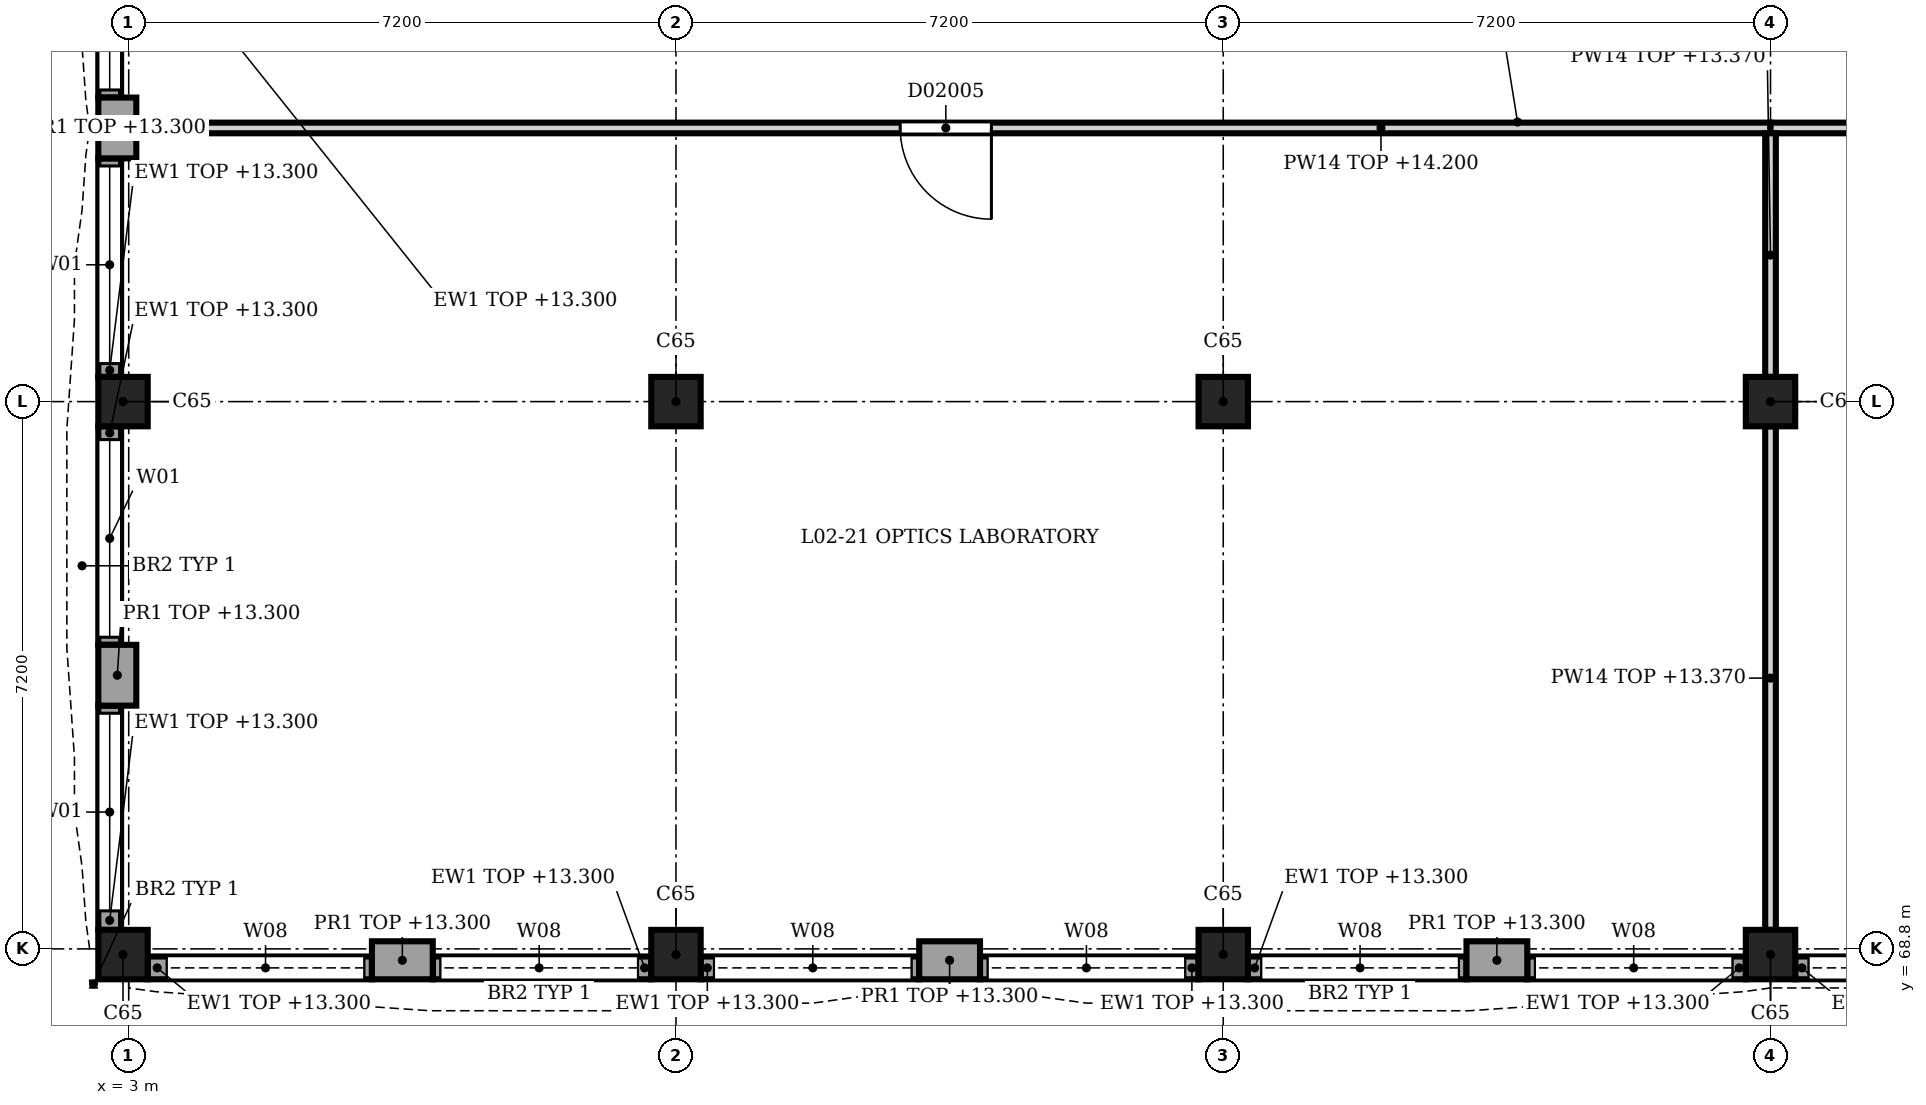
"""IFC4 building model, lengths in metres.
Left out: names, types, materials, properties, quantities, classifications, styles, units other than length and angle.
Written with IfcOpenShell. Run it as: python <this file> out.ifc"""

import sys

from ifc_helpers import new_model, si_unit, direction, frame, frame_2d, origin, origin_2d, place, context, subcontext, project, spatial, rectangle, extrude, element, fill, save


model = new_model("IFC4")
c1 = context("Model", 3, precision=1e-05, world=origin(), true_north=direction((0.0, 1.0)))
c2 = subcontext(c1, "Body", "Model", "MODEL_VIEW")
j1 = project(units=[si_unit("LENGTHUNIT", "METRE"), si_unit("PLANEANGLEUNIT", "RADIAN")], contexts=[c1])
p1 = place(None, origin())
s1 = spatial("IfcSite", under=j1, at=p1, CompositionType="ELEMENT")
p2 = place(p1, origin())
s2 = spatial("IfcBuilding", under=s1, at=p2, CompositionType="ELEMENT")
p3 = place(p2, frame((0.0, 0.0, 9.9)))
s3 = spatial("IfcBuildingStorey", under=s2, at=p3, CompositionType="ELEMENT", Elevation=9.9)
for number, where, z_axis, x_axis in (
    (1, (2.925, 68.725, 0.0), (0.0, 0.0, 1.0), (1.0, 0.0, 0.0)),
    (2, (2.925, 76.0, 0.0), (0.0, 0.0, 1.0), (1.0, 0.0, 0.0)),
    (3, (10.2, 68.725, 0.0), (0.0, 0.0, 1.0), (1.0, 0.0, 0.0)),
    (4, (10.2, 76.0, 0.0), (0.0, 0.0, 1.0), (1.0, 0.0, 0.0)),
    (5, (17.4, 68.725, 0.0), (0.0, 0.0, 1.0), (1.0, 0.0, 0.0)),
    (6, (17.4, 76.0, 0.0), (0.0, 0.0, 1.0), (1.0, 0.0, 0.0)),
    (7, (24.6, 68.725, 0.0), (0.0, 0.0, 1.0), (1.0, 0.0, 0.0)),
    (8, (24.6, 76.0, 0.0), (0.0, 0.0, 1.0), (1.0, 0.0, 0.0)),
):
    element("IfcColumn", number, at=place(p3, frame(where, z_axis=z_axis, x_axis=x_axis)), inside=s3, PredefinedType="COLUMN", context=c2, shape_type="SweptSolid", body=[
        extrude(rectangle(XDim=0.65, YDim=0.65, at=origin_2d()), origin(), (0.0, 0.0, 1.0), 4.5),
    ])
p4 = place(p3, frame((21.4, 68.65, 0.0), z_axis=(0.0, 0.0, 1.0), x_axis=(-1.0, 0.0, 0.0)))
e9 = element("IfcWall", 9, at=p4, inside=s3, PredefinedType="SOLIDWALL", context=c2, shape_type="SweptSolid", body=[
    extrude(rectangle(XDim=0.8, YDim=0.5, at=frame_2d((0.4, 0.0))), origin(), (0.0, 0.0, 1.0), 3.4),
])
for number, where, z_axis, x_axis in (
    (10, (14.2, 68.65, 0.0), (0.0, 0.0, 1.0), (-1.0, 0.0, 0.0)),
    (11, (7.0, 68.65, 0.0), (0.0, 0.0, 1.0), (-1.0, 0.0, 0.0)),
):
    element("IfcWall", number, at=place(p3, frame(where, z_axis=z_axis, x_axis=x_axis)), inside=s3, PredefinedType="SOLIDWALL", context=c2, shape_type="SweptSolid", body=[
        extrude(rectangle(XDim=0.8, YDim=0.5, at=frame_2d((0.4, 0.0))), origin(), (0.0, 0.0, 1.0), 3.4),
    ])
p5 = place(p3, frame((27.8, 68.55, 0.0), z_axis=(0.0, 0.0, 1.0), x_axis=(-1.0, 0.0, 0.0)))
e12 = element("IfcWall", 12, at=p5, inside=s3, PredefinedType="SOLIDWALL", context=c2, shape_type="SweptSolid", body=[
    extrude(rectangle(XDim=2.875, YDim=0.3, at=frame_2d((1.438, 0.0))), origin(), (0.0, 0.0, 1.0), 3.4),
])
p6 = place(p5, frame((0.1, 0.0, 1.2)))
e13 = element("IfcOpeningElement", 13, at=p6, cuts=e12, PredefinedType="OPENING", context=c2, shape_type="SweptSolid", body=[
    extrude(rectangle(XDim=2.6, YDim=2.1, at=frame_2d((1.3, 1.05))), frame((0.0, 0.16, 0.0), z_axis=(0.0, -1.0, 0.0), x_axis=(1.0, 0.0, 0.0)), (0.0, 0.0, 1.0), 0.32),
])
p7 = place(p3, frame((24.275, 68.55, 0.0), z_axis=(0.0, 0.0, 1.0), x_axis=(-1.0, 0.0, 0.0)))
e14 = element("IfcWall", 14, at=p7, inside=s3, PredefinedType="SOLIDWALL", context=c2, shape_type="SweptSolid", body=[
    extrude(rectangle(XDim=2.875, YDim=0.3, at=frame_2d((1.438, 0.0))), origin(), (0.0, 0.0, 1.0), 3.4),
])
p8 = place(p7, frame((0.175, 0.0, 1.2)))
e15 = element("IfcOpeningElement", 15, at=p8, cuts=e14, PredefinedType="OPENING", context=c2, shape_type="SweptSolid", body=[
    extrude(rectangle(XDim=2.6, YDim=2.1, at=frame_2d((1.3, 1.05))), frame((0.0, 0.16, 0.0), z_axis=(0.0, -1.0, 0.0), x_axis=(1.0, 0.0, 0.0)), (0.0, 0.0, 1.0), 0.32),
])
p9 = place(p3, frame((20.6, 68.55, 0.0), z_axis=(0.0, 0.0, 1.0), x_axis=(-1.0, 0.0, 0.0)))
e16 = element("IfcWall", 16, at=p9, inside=s3, PredefinedType="SOLIDWALL", context=c2, shape_type="SweptSolid", body=[
    extrude(rectangle(XDim=2.875, YDim=0.3, at=frame_2d((1.438, 0.0))), origin(), (0.0, 0.0, 1.0), 3.4),
])
p10 = place(p9, frame((0.1, 0.0, 1.2)))
e17 = element("IfcOpeningElement", 17, at=p10, cuts=e16, PredefinedType="OPENING", context=c2, shape_type="SweptSolid", body=[
    extrude(rectangle(XDim=2.6, YDim=2.1, at=frame_2d((1.3, 1.05))), frame((0.0, 0.16, 0.0), z_axis=(0.0, -1.0, 0.0), x_axis=(1.0, 0.0, 0.0)), (0.0, 0.0, 1.0), 0.32),
])
p11 = place(p3, frame((17.075, 68.55, 0.0), z_axis=(0.0, 0.0, 1.0), x_axis=(-1.0, 0.0, 0.0)))
e18 = element("IfcWall", 18, at=p11, inside=s3, PredefinedType="SOLIDWALL", context=c2, shape_type="SweptSolid", body=[
    extrude(rectangle(XDim=2.875, YDim=0.3, at=frame_2d((1.438, 0.0))), origin(), (0.0, 0.0, 1.0), 3.4),
])
p12 = place(p11, frame((0.175, 0.0, 1.2)))
e19 = element("IfcOpeningElement", 19, at=p12, cuts=e18, PredefinedType="OPENING", context=c2, shape_type="SweptSolid", body=[
    extrude(rectangle(XDim=2.6, YDim=2.1, at=frame_2d((1.3, 1.05))), frame((0.0, 0.16, 0.0), z_axis=(0.0, -1.0, 0.0), x_axis=(1.0, 0.0, 0.0)), (0.0, 0.0, 1.0), 0.32),
])
p13 = place(p3, frame((13.4, 68.55, 0.0), z_axis=(0.0, 0.0, 1.0), x_axis=(-1.0, 0.0, 0.0)))
e20 = element("IfcWall", 20, at=p13, inside=s3, PredefinedType="SOLIDWALL", context=c2, shape_type="SweptSolid", body=[
    extrude(rectangle(XDim=2.875, YDim=0.3, at=frame_2d((1.438, 0.0))), origin(), (0.0, 0.0, 1.0), 3.4),
])
p14 = place(p13, frame((0.1, 0.0, 1.2)))
e21 = element("IfcOpeningElement", 21, at=p14, cuts=e20, PredefinedType="OPENING", context=c2, shape_type="SweptSolid", body=[
    extrude(rectangle(XDim=2.6, YDim=2.1, at=frame_2d((1.3, 1.05))), frame((0.0, 0.16, 0.0), z_axis=(0.0, -1.0, 0.0), x_axis=(1.0, 0.0, 0.0)), (0.0, 0.0, 1.0), 0.32),
])
p15 = place(p3, frame((9.875, 68.55, 0.0), z_axis=(0.0, 0.0, 1.0), x_axis=(-1.0, 0.0, 0.0)))
e22 = element("IfcWall", 22, at=p15, inside=s3, PredefinedType="SOLIDWALL", context=c2, shape_type="SweptSolid", body=[
    extrude(rectangle(XDim=2.875, YDim=0.3, at=frame_2d((1.438, 0.0))), origin(), (0.0, 0.0, 1.0), 3.4),
])
p16 = place(p15, frame((0.175, 0.0, 1.2)))
e23 = element("IfcOpeningElement", 23, at=p16, cuts=e22, PredefinedType="OPENING", context=c2, shape_type="SweptSolid", body=[
    extrude(rectangle(XDim=2.6, YDim=2.1, at=frame_2d((1.3, 1.05))), frame((0.0, 0.16, 0.0), z_axis=(0.0, -1.0, 0.0), x_axis=(1.0, 0.0, 0.0)), (0.0, 0.0, 1.0), 0.32),
])
p17 = place(p3, frame((6.2, 68.55, 0.0), z_axis=(0.0, 0.0, 1.0), x_axis=(-1.0, 0.0, 0.0)))
e24 = element("IfcWall", 24, at=p17, inside=s3, PredefinedType="SOLIDWALL", context=c2, shape_type="SweptSolid", body=[
    extrude(rectangle(XDim=2.95, YDim=0.3, at=frame_2d((1.475, 0.0))), origin(), (0.0, 0.0, 1.0), 3.4),
])
p18 = place(p17, frame((0.1, 0.0, 1.2)))
e25 = element("IfcOpeningElement", 25, at=p18, cuts=e24, PredefinedType="OPENING", context=c2, shape_type="SweptSolid", body=[
    extrude(rectangle(XDim=2.6, YDim=2.1, at=frame_2d((1.3, 1.05))), frame((0.0, 0.16, 0.0), z_axis=(0.0, -1.0, 0.0), x_axis=(1.0, 0.0, 0.0)), (0.0, 0.0, 1.0), 0.32),
])
for number, where, z_axis, x_axis in (
    (26, (2.85, 72.0, 0.0), (0.0, 0.0, 1.0), (0.0, 1.0, 0.0)),
    (27, (2.85, 79.2, 0.0), (0.0, 0.0, 1.0), (0.0, 1.0, 0.0)),
):
    element("IfcWall", number, at=place(p3, frame(where, z_axis=z_axis, x_axis=x_axis)), inside=s3, PredefinedType="SOLIDWALL", context=c2, shape_type="SweptSolid", body=[
        extrude(rectangle(XDim=0.8, YDim=0.5, at=frame_2d((0.4, 0.0))), origin(), (0.0, 0.0, 1.0), 3.4),
    ])
p19 = place(p3, frame((2.75, 69.05, 0.0), z_axis=(0.0, 0.0, 1.0), x_axis=(0.0, 1.0, 0.0)))
e28 = element("IfcWall", 28, at=p19, inside=s3, PredefinedType="SOLIDWALL", context=c2, shape_type="SweptSolid", body=[
    extrude(rectangle(XDim=2.95, YDim=0.3, at=frame_2d((1.475, 0.0))), origin(), (0.0, 0.0, 1.0), 3.4),
])
p20 = place(p19, frame((0.25, 0.0, 0.9)))
e29 = element("IfcOpeningElement", 29, at=p20, cuts=e28, PredefinedType="OPENING", context=c2, shape_type="SweptSolid", body=[
    extrude(rectangle(XDim=2.6, YDim=2.4, at=frame_2d((1.3, 1.2))), frame((0.0, 0.16, 0.0), z_axis=(0.0, -1.0, 0.0), x_axis=(1.0, 0.0, 0.0)), (0.0, 0.0, 1.0), 0.32),
])
p21 = place(p3, frame((2.75, 72.8, 0.0), z_axis=(0.0, 0.0, 1.0), x_axis=(0.0, 1.0, 0.0)))
e30 = element("IfcWall", 30, at=p21, inside=s3, PredefinedType="SOLIDWALL", context=c2, shape_type="SweptSolid", body=[
    extrude(rectangle(XDim=2.875, YDim=0.3, at=frame_2d((1.438, 0.0))), origin(), (0.0, 0.0, 1.0), 3.4),
])
p22 = place(p21, frame((0.1, 0.0, 0.9)))
e31 = element("IfcOpeningElement", 31, at=p22, cuts=e30, PredefinedType="OPENING", context=c2, shape_type="SweptSolid", body=[
    extrude(rectangle(XDim=2.6, YDim=2.4, at=frame_2d((1.3, 1.2))), frame((0.0, 0.16, 0.0), z_axis=(0.0, -1.0, 0.0), x_axis=(1.0, 0.0, 0.0)), (0.0, 0.0, 1.0), 0.32),
])
p23 = place(p3, frame((2.75, 76.325, 0.0), z_axis=(0.0, 0.0, 1.0), x_axis=(0.0, 1.0, 0.0)))
e32 = element("IfcWall", 32, at=p23, inside=s3, PredefinedType="SOLIDWALL", context=c2, shape_type="SweptSolid", body=[
    extrude(rectangle(XDim=2.875, YDim=0.3, at=frame_2d((1.438, 0.0))), origin(), (0.0, 0.0, 1.0), 3.4),
])
p24 = place(p23, frame((0.175, 0.0, 0.9)))
e33 = element("IfcOpeningElement", 33, at=p24, cuts=e32, PredefinedType="OPENING", context=c2, shape_type="SweptSolid", body=[
    extrude(rectangle(XDim=2.6, YDim=2.4, at=frame_2d((1.3, 1.2))), frame((0.0, 0.16, 0.0), z_axis=(0.0, -1.0, 0.0), x_axis=(1.0, 0.0, 0.0)), (0.0, 0.0, 1.0), 0.32),
])
p25 = place(p3, frame((2.75, 80.0, 0.0), z_axis=(0.0, 0.0, 1.0), x_axis=(0.0, 1.0, 0.0)))
e34 = element("IfcWall", 34, at=p25, inside=s3, PredefinedType="SOLIDWALL", context=c2, shape_type="SweptSolid", body=[
    extrude(rectangle(XDim=2.875, YDim=0.3, at=frame_2d((1.438, 0.0))), origin(), (0.0, 0.0, 1.0), 3.4),
])
p26 = place(p25, frame((0.1, 0.0, 0.9)))
e35 = element("IfcOpeningElement", 35, at=p26, cuts=e34, PredefinedType="OPENING", context=c2, shape_type="SweptSolid", body=[
    extrude(rectangle(XDim=2.6, YDim=2.4, at=frame_2d((1.3, 1.2))), frame((0.0, 0.16, 0.0), z_axis=(0.0, -1.0, 0.0), x_axis=(1.0, 0.0, 0.0)), (0.0, 0.0, 1.0), 0.32),
])
p27 = place(p3, frame((24.6, 79.6, 0.0), z_axis=(0.0, 0.0, 1.0), x_axis=(-1.0, 0.0, 0.0)))
e36 = element("IfcWall", 36, at=p27, inside=s3, PredefinedType="PARTITIONING", context=c2, shape_type="SweptSolid", body=[
    extrude(rectangle(XDim=21.5, YDim=0.14, at=frame_2d((10.75, 0.0))), origin(), (0.0, 0.0, 1.0), 4.3),
])
p28 = place(p27, frame((10.25, 0.0, 0.0)))
e37 = element("IfcOpeningElement", 37, at=p28, cuts=e36, PredefinedType="OPENING", context=c2, shape_type="SweptSolid", body=[
    extrude(rectangle(XDim=1.2, YDim=2.1, at=frame_2d((0.6, 1.05))), frame((0.0, 0.08, 0.0), z_axis=(0.0, -1.0, 0.0), x_axis=(1.0, 0.0, 0.0)), (0.0, 0.0, 1.0), 0.16),
])
p29 = place(p3, frame((35.4, 79.6, 0.0), z_axis=(0.0, 0.0, 1.0), x_axis=(-1.0, 0.0, 0.0)))
e38 = element("IfcWall", 38, at=p29, inside=s3, PredefinedType="PARTITIONING", context=c2, shape_type="SweptSolid", body=[
    extrude(rectangle(XDim=10.8, YDim=0.14, at=frame_2d((5.4, 0.0))), origin(), (0.0, 0.0, 1.0), 4.3),
])
p30 = place(p29, frame((4.85, 0.0, 0.0)))
e39 = element("IfcOpeningElement", 39, at=p30, cuts=e38, PredefinedType="OPENING", context=c2, shape_type="SweptSolid", body=[
    extrude(rectangle(XDim=1.2, YDim=2.1, at=frame_2d((0.6, 1.05))), frame((0.0, 0.08, 0.0), z_axis=(0.0, -1.0, 0.0), x_axis=(1.0, 0.0, 0.0)), (0.0, 0.0, 1.0), 0.16),
])
p31 = place(p3, frame((24.6, 69.05, 0.0), z_axis=(0.0, 0.0, 1.0), x_axis=(0.0, 1.0, 0.0)))
e40 = element("IfcWall", 40, at=p31, inside=s3, PredefinedType="PARTITIONING", context=c2, shape_type="SweptSolid", body=[
    extrude(rectangle(XDim=6.625, YDim=0.14, at=frame_2d((3.312, 0.0))), origin(), (0.0, 0.0, 1.0), 3.47),
])
p32 = place(p3, frame((24.6, 76.325, 0.0), z_axis=(0.0, 0.0, 1.0), x_axis=(0.0, 1.0, 0.0)))
e41 = element("IfcWall", 41, at=p32, inside=s3, PredefinedType="PARTITIONING", context=c2, shape_type="SweptSolid", body=[
    extrude(rectangle(XDim=3.205, YDim=0.14, at=frame_2d((1.603, 0.0))), origin(), (0.0, 0.0, 1.0), 3.47),
])
p33 = place(p6, origin())
e42 = element("IfcWindow", 42, at=p33, inside=s3, PartitioningType="SINGLE_PANEL", PredefinedType="WINDOW", context=c2, shape_type="SweptSolid", body=[
    extrude(rectangle(XDim=2.6, YDim=2.1, at=frame_2d((1.3, 1.05))), frame((0.0, 0.03, 0.0), z_axis=(0.0, -1.0, 0.0), x_axis=(1.0, 0.0, 0.0)), (0.0, 0.0, 1.0), 0.06),
])
fill(e13, e42)
p34 = place(p8, origin())
e43 = element("IfcWindow", 43, at=p34, inside=s3, PartitioningType="SINGLE_PANEL", PredefinedType="WINDOW", context=c2, shape_type="SweptSolid", body=[
    extrude(rectangle(XDim=2.6, YDim=2.1, at=frame_2d((1.3, 1.05))), frame((0.0, 0.03, 0.0), z_axis=(0.0, -1.0, 0.0), x_axis=(1.0, 0.0, 0.0)), (0.0, 0.0, 1.0), 0.06),
])
fill(e15, e43)
p35 = place(p10, origin())
e44 = element("IfcWindow", 44, at=p35, inside=s3, PartitioningType="SINGLE_PANEL", PredefinedType="WINDOW", context=c2, shape_type="SweptSolid", body=[
    extrude(rectangle(XDim=2.6, YDim=2.1, at=frame_2d((1.3, 1.05))), frame((0.0, 0.03, 0.0), z_axis=(0.0, -1.0, 0.0), x_axis=(1.0, 0.0, 0.0)), (0.0, 0.0, 1.0), 0.06),
])
fill(e17, e44)
p36 = place(p12, origin())
e45 = element("IfcWindow", 45, at=p36, inside=s3, PartitioningType="SINGLE_PANEL", PredefinedType="WINDOW", context=c2, shape_type="SweptSolid", body=[
    extrude(rectangle(XDim=2.6, YDim=2.1, at=frame_2d((1.3, 1.05))), frame((0.0, 0.03, 0.0), z_axis=(0.0, -1.0, 0.0), x_axis=(1.0, 0.0, 0.0)), (0.0, 0.0, 1.0), 0.06),
])
fill(e19, e45)
p37 = place(p14, origin())
e46 = element("IfcWindow", 46, at=p37, inside=s3, PartitioningType="SINGLE_PANEL", PredefinedType="WINDOW", context=c2, shape_type="SweptSolid", body=[
    extrude(rectangle(XDim=2.6, YDim=2.1, at=frame_2d((1.3, 1.05))), frame((0.0, 0.03, 0.0), z_axis=(0.0, -1.0, 0.0), x_axis=(1.0, 0.0, 0.0)), (0.0, 0.0, 1.0), 0.06),
])
fill(e21, e46)
p38 = place(p16, origin())
e47 = element("IfcWindow", 47, at=p38, inside=s3, PartitioningType="SINGLE_PANEL", PredefinedType="WINDOW", context=c2, shape_type="SweptSolid", body=[
    extrude(rectangle(XDim=2.6, YDim=2.1, at=frame_2d((1.3, 1.05))), frame((0.0, 0.03, 0.0), z_axis=(0.0, -1.0, 0.0), x_axis=(1.0, 0.0, 0.0)), (0.0, 0.0, 1.0), 0.06),
])
fill(e23, e47)
p39 = place(p18, origin())
e48 = element("IfcWindow", 48, at=p39, inside=s3, PartitioningType="SINGLE_PANEL", PredefinedType="WINDOW", context=c2, shape_type="SweptSolid", body=[
    extrude(rectangle(XDim=2.6, YDim=2.1, at=frame_2d((1.3, 1.05))), frame((0.0, 0.03, 0.0), z_axis=(0.0, -1.0, 0.0), x_axis=(1.0, 0.0, 0.0)), (0.0, 0.0, 1.0), 0.06),
])
fill(e25, e48)
p40 = place(p20, origin())
e49 = element("IfcWindow", 49, at=p40, inside=s3, PartitioningType="SINGLE_PANEL", PredefinedType="WINDOW", context=c2, shape_type="SweptSolid", body=[
    extrude(rectangle(XDim=2.6, YDim=2.4, at=frame_2d((1.3, 1.2))), frame((0.0, 0.03, 0.0), z_axis=(0.0, -1.0, 0.0), x_axis=(1.0, 0.0, 0.0)), (0.0, 0.0, 1.0), 0.06),
])
fill(e29, e49)
p41 = place(p22, origin())
e50 = element("IfcWindow", 50, at=p41, inside=s3, PartitioningType="SINGLE_PANEL", PredefinedType="WINDOW", context=c2, shape_type="SweptSolid", body=[
    extrude(rectangle(XDim=2.6, YDim=2.4, at=frame_2d((1.3, 1.2))), frame((0.0, 0.03, 0.0), z_axis=(0.0, -1.0, 0.0), x_axis=(1.0, 0.0, 0.0)), (0.0, 0.0, 1.0), 0.06),
])
fill(e31, e50)
p42 = place(p24, origin())
e51 = element("IfcWindow", 51, at=p42, inside=s3, PartitioningType="SINGLE_PANEL", PredefinedType="WINDOW", context=c2, shape_type="SweptSolid", body=[
    extrude(rectangle(XDim=2.6, YDim=2.4, at=frame_2d((1.3, 1.2))), frame((0.0, 0.03, 0.0), z_axis=(0.0, -1.0, 0.0), x_axis=(1.0, 0.0, 0.0)), (0.0, 0.0, 1.0), 0.06),
])
fill(e33, e51)
p43 = place(p26, origin())
e52 = element("IfcWindow", 52, at=p43, inside=s3, PartitioningType="SINGLE_PANEL", PredefinedType="WINDOW", context=c2, shape_type="SweptSolid", body=[
    extrude(rectangle(XDim=2.6, YDim=2.4, at=frame_2d((1.3, 1.2))), frame((0.0, 0.03, 0.0), z_axis=(0.0, -1.0, 0.0), x_axis=(1.0, 0.0, 0.0)), (0.0, 0.0, 1.0), 0.06),
])
fill(e35, e52)
p44 = place(p28, origin())
e53 = element("IfcDoor", 53, at=p44, inside=s3, OperationType="SINGLE_SWING_RIGHT", PredefinedType="DOOR", context=c2, shape_type="SweptSolid", body=[
    extrude(rectangle(XDim=1.2, YDim=2.1, at=frame_2d((0.6, 1.05))), frame((0.0, 0.025, 0.0), z_axis=(0.0, -1.0, 0.0), x_axis=(1.0, 0.0, 0.0)), (0.0, 0.0, 1.0), 0.05),
])
fill(e37, e53)
save(model, sys.argv[1])
